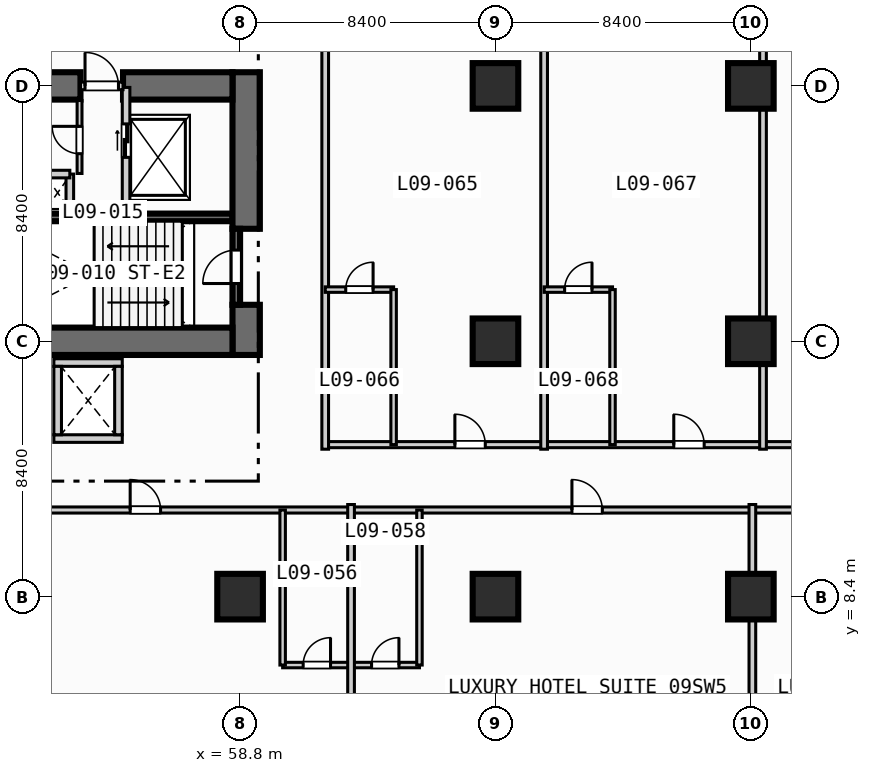
"""IFC4 building model, lengths in metres.
Left out: names, types, materials, properties, quantities, classifications, styles, units other than length and angle.
Written with IfcOpenShell. Run it as: python <this file> out.ifc"""

import sys

from ifc_helpers import new_model, si_unit, direction, frame, frame_2d, origin, origin_2d, place, context, subcontext, project, spatial, rectangle, extrude, element, fill, save


model = new_model("IFC4")
c1 = context("Model", 3, precision=1e-05, world=origin(), true_north=direction((0.0, 1.0)))
c2 = subcontext(c1, "Body", "Model", "MODEL_VIEW")
j1 = project(units=[si_unit("LENGTHUNIT", "METRE"), si_unit("PLANEANGLEUNIT", "RADIAN")], contexts=[c1])
p1 = place(None, origin())
s1 = spatial("IfcSite", under=j1, at=p1, CompositionType="ELEMENT")
p2 = place(p1, origin())
s2 = spatial("IfcBuilding", under=s1, at=p2, CompositionType="ELEMENT")
p3 = place(p2, frame((0.0, 0.0, 43.4)))
s3 = spatial("IfcBuildingStorey", under=s2, at=p3, CompositionType="ELEMENT", Elevation=43.4)
p4 = place(p3, frame((50.5, 20.875, 0.0), z_axis=(0.0, 0.0, 1.0), x_axis=(1.0, 0.0, 0.0)))
e1 = element("IfcWall", 1, at=p4, inside=s3, PredefinedType="SOLIDWALL", context=c2, shape_type="SweptSolid", body=[
    extrude(rectangle(XDim=8.05, YDim=0.25, at=frame_2d((4.025, 0.0))), origin(), (0.0, 0.0, 1.0), 3.55),
])
p5 = place(p3, frame((59.0, 16.35, 0.0), z_axis=(0.0, 0.0, 1.0), x_axis=(0.0, 1.0, 0.0)))
e2 = element("IfcWall", 2, at=p5, inside=s3, PredefinedType="SHEAR", context=c2, shape_type="SweptSolid", body=[
    extrude(rectangle(XDim=1.65, YDim=0.9, at=frame_2d((0.825, 0.0))), origin(), (0.0, 0.0, 1.0), 3.55),
])
p6 = place(p3, frame((59.0, 20.5, 0.0), z_axis=(0.0, 0.0, 1.0), x_axis=(0.0, 1.0, 0.0)))
e3 = element("IfcWall", 3, at=p6, inside=s3, PredefinedType="SHEAR", context=c2, shape_type="SweptSolid", body=[
    extrude(rectangle(XDim=5.15, YDim=0.9, at=frame_2d((2.575, 0.0))), origin(), (0.0, 0.0, 1.0), 3.55),
])
p7 = place(p3, frame((42.2, 16.8, 0.0), z_axis=(0.0, 0.0, 1.0), x_axis=(1.0, 0.0, 0.0)))
e4 = element("IfcWall", 4, at=p7, inside=s3, PredefinedType="SHEAR", context=c2, shape_type="SweptSolid", body=[
    extrude(rectangle(XDim=16.35, YDim=0.9, at=frame_2d((8.175, 0.0))), origin(), (0.0, 0.0, 1.0), 3.55),
])
p8 = place(p3, frame((52.28, 25.2, 0.0), z_axis=(0.0, 0.0, 1.0), x_axis=(1.0, 0.0, 0.0)))
e5 = element("IfcWall", 5, at=p8, inside=s3, PredefinedType="SHEAR", context=c2, shape_type="SweptSolid", body=[
    extrude(rectangle(XDim=1.27, YDim=0.9, at=frame_2d((0.635, 0.0))), origin(), (0.0, 0.0, 1.0), 3.55),
])
p9 = place(p3, frame((54.95, 25.2, 0.0), z_axis=(0.0, 0.0, 1.0), x_axis=(1.0, 0.0, 0.0)))
e6 = element("IfcWall", 6, at=p9, inside=s3, PredefinedType="SHEAR", context=c2, shape_type="SweptSolid", body=[
    extrude(rectangle(XDim=3.6, YDim=0.9, at=frame_2d((1.8, 0.0))), origin(), (0.0, 0.0, 1.0), 3.55),
])
for number, where, z_axis, x_axis in (
    (7, (58.8, 8.4, 0.0), (0.0, 0.0, 1.0), (1.0, 0.0, 0.0)),
    (8, (67.2, 8.4, 0.0), (0.0, 0.0, 1.0), (1.0, 0.0, 0.0)),
    (9, (67.2, 16.8, 0.0), (0.0, 0.0, 1.0), (1.0, 0.0, 0.0)),
    (10, (67.2, 25.2, 0.0), (0.0, 0.0, 1.0), (1.0, 0.0, 0.0)),
    (11, (75.6, 8.4, 0.0), (0.0, 0.0, 1.0), (1.0, 0.0, 0.0)),
    (12, (75.6, 16.8, 0.0), (0.0, 0.0, 1.0), (1.0, 0.0, 0.0)),
    (13, (75.6, 25.2, 0.0), (0.0, 0.0, 1.0), (1.0, 0.0, 0.0)),
):
    element("IfcColumn", number, at=place(p3, frame(where, z_axis=z_axis, x_axis=x_axis)), inside=s3, PredefinedType="COLUMN", context=c2, shape_type="SweptSolid", body=[
        extrude(rectangle(XDim=1.5, YDim=1.5, at=origin_2d()), origin(), (0.0, 0.0, 1.0), 3.8),
    ])
p10 = place(p3, frame((58.675, 18.0, 0.0), z_axis=(0.0, 0.0, 1.0), x_axis=(0.0, 1.0, 0.0)))
e14 = element("IfcWall", 14, at=p10, inside=s3, PredefinedType="SOLIDWALL", context=c2, shape_type="SweptSolid", body=[
    extrude(rectangle(XDim=2.5, YDim=0.25, at=frame_2d((1.25, 0.0))), origin(), (0.0, 0.0, 1.0), 3.55),
])
p11 = place(p10, frame((0.7, 0.0, 0.0)))
e15 = element("IfcOpeningElement", 15, at=p11, cuts=e14, PredefinedType="OPENING", context=c2, shape_type="SweptSolid", body=[
    extrude(rectangle(XDim=1.1, YDim=2.15, at=frame_2d((0.55, 1.075))), frame((0.0, 0.135, 0.0), z_axis=(0.0, -1.0, 0.0), x_axis=(1.0, 0.0, 0.0)), (0.0, 0.0, 1.0), 0.27),
])
p12 = place(p3, frame((55.05, 21.0, 0.0), z_axis=(0.0, 0.0, 1.0), x_axis=(0.0, 1.0, 0.0)))
e16 = element("IfcWall", 16, at=p12, inside=s3, PredefinedType="SOLIDWALL", context=c2, shape_type="SweptSolid", body=[
    extrude(rectangle(XDim=4.15, YDim=0.25, at=frame_2d((2.075, 0.0))), origin(), (0.0, 0.0, 1.0), 3.55),
])
p13 = place(p12, frame((1.85, 0.0, 0.0)))
e17 = element("IfcOpeningElement", 17, at=p13, cuts=e16, PredefinedType="OPENING", context=c2, shape_type="SweptSolid", body=[
    extrude(rectangle(XDim=1.1, YDim=2.15, at=frame_2d((0.55, 1.075))), frame((0.0, 0.135, 0.0), z_axis=(0.0, -1.0, 0.0), x_axis=(1.0, 0.0, 0.0)), (0.0, 0.0, 1.0), 0.27),
])
p14 = place(p3, frame((53.55, 25.2, 0.0), z_axis=(0.0, 0.0, 1.0), x_axis=(1.0, 0.0, 0.0)))
e18 = element("IfcWall", 18, at=p14, inside=s3, PredefinedType="SOLIDWALL", context=c2, shape_type="SweptSolid", body=[
    extrude(rectangle(XDim=1.4, YDim=0.25, at=frame_2d((0.7, 0.0))), origin(), (0.0, 0.0, 1.0), 3.55),
])
p15 = place(p14, frame((0.15, 0.0, 0.0)))
e19 = element("IfcOpeningElement", 19, at=p15, cuts=e18, PredefinedType="OPENING", context=c2, shape_type="SweptSolid", body=[
    extrude(rectangle(XDim=1.1, YDim=2.15, at=frame_2d((0.55, 1.075))), frame((0.0, 0.135, 0.0), z_axis=(0.0, -1.0, 0.0), x_axis=(1.0, 0.0, 0.0)), (0.0, 0.0, 1.0), 0.27),
])
p16 = place(p3, frame((53.2, 21.0, 0.0), z_axis=(0.0, 0.0, 1.0), x_axis=(0.0, 1.0, 0.0)))
e20 = element("IfcWall", 20, at=p16, inside=s3, PredefinedType="SOLIDWALL", context=c2, shape_type="SweptSolid", body=[
    extrude(rectangle(XDim=1.3, YDim=0.25, at=frame_2d((0.65, 0.0))), origin(), (0.0, 0.0, 1.0), 3.55),
])
p17 = place(p3, frame((52.36, 22.3, 0.0), z_axis=(0.0, 0.0, 1.0), x_axis=(1.0, 0.0, 0.0)))
e21 = element("IfcWall", 21, at=p17, inside=s3, PredefinedType="SOLIDWALL", context=c2, shape_type="SweptSolid", body=[
    extrude(rectangle(XDim=0.84, YDim=0.25, at=frame_2d((0.42, 0.0))), origin(), (0.0, 0.0, 1.0), 3.55),
])
p18 = place(p3, frame((53.52, 22.32, 0.0), z_axis=(0.0, 0.0, 1.0), x_axis=(0.0, 1.0, 0.0)))
e22 = element("IfcWall", 22, at=p18, inside=s3, PredefinedType="PARTITIONING", context=c2, shape_type="SweptSolid", body=[
    extrude(rectangle(XDim=2.4, YDim=0.16, at=frame_2d((1.2, 0.0))), origin(), (0.0, 0.0, 1.0), 3.55),
])
p19 = place(p18, frame((0.65, 0.0, 0.0)))
e23 = element("IfcOpeningElement", 23, at=p19, cuts=e22, PredefinedType="OPENING", context=c2, shape_type="SweptSolid", body=[
    extrude(rectangle(XDim=0.9, YDim=2.1, at=frame_2d((0.45, 1.05))), frame((0.0, 0.09, 0.0), z_axis=(0.0, -1.0, 0.0), x_axis=(1.0, 0.0, 0.0)), (0.0, 0.0, 1.0), 0.18),
])
for number, where, z_axis, x_axis in (
    (24, (52.675, 13.6, 0.0), (0.0, 0.0, 1.0), (1.0, 0.0, 0.0)),
    (25, (52.675, 16.1, 0.0), (0.0, 0.0, 1.0), (1.0, 0.0, 0.0)),
    (26, (52.8, 13.725, 0.0), (0.0, 0.0, 1.0), (0.0, 1.0, 0.0)),
    (27, (54.8, 13.725, 0.0), (0.0, 0.0, 1.0), (0.0, 1.0, 0.0)),
):
    element("IfcWall", number, at=place(p3, frame(where, z_axis=z_axis, x_axis=x_axis)), inside=s3, PredefinedType="SOLIDWALL", context=c2, shape_type="SweptSolid", body=[
        extrude(rectangle(XDim=2.25, YDim=0.25, at=frame_2d((1.125, 0.0))), origin(), (0.0, 0.0, 1.0), 3.55),
    ])
p20 = place(p3, frame((13.65, 11.25, 0.0), z_axis=(0.0, 0.0, 1.0), x_axis=(1.0, 0.0, 0.0)))
e28 = element("IfcWall", 28, at=p20, inside=s3, PredefinedType="PARTITIONING", context=c2, shape_type="SweptSolid", body=[
    extrude(rectangle(XDim=75.15, YDim=0.2, at=frame_2d((37.575, 0.0))), origin(), (0.0, 0.0, 1.0), 3.55),
])
p21 = place(p20, frame((7.265, 0.0, 0.0)))
e29 = element("IfcOpeningElement", 29, at=p21, cuts=e28, PredefinedType="OPENING", context=c2, shape_type="SweptSolid", body=[
    extrude(rectangle(XDim=1.0, YDim=2.15, at=frame_2d((0.5, 1.075))), frame((0.0, 0.11, 0.0), z_axis=(0.0, -1.0, 0.0), x_axis=(1.0, 0.0, 0.0)), (0.0, 0.0, 1.0), 0.22),
])
p22 = place(p20, frame((17.135, 0.0, 0.0)))
e30 = element("IfcOpeningElement", 30, at=p22, cuts=e28, PredefinedType="OPENING", context=c2, shape_type="SweptSolid", body=[
    extrude(rectangle(XDim=1.0, YDim=2.15, at=frame_2d((0.5, 1.075))), frame((0.0, 0.11, 0.0), z_axis=(0.0, -1.0, 0.0), x_axis=(1.0, 0.0, 0.0)), (0.0, 0.0, 1.0), 0.22),
])
p23 = place(p20, frame((31.665, 0.0, 0.0)))
e31 = element("IfcOpeningElement", 31, at=p23, cuts=e28, PredefinedType="OPENING", context=c2, shape_type="SweptSolid", body=[
    extrude(rectangle(XDim=1.0, YDim=2.15, at=frame_2d((0.5, 1.075))), frame((0.0, 0.11, 0.0), z_axis=(0.0, -1.0, 0.0), x_axis=(1.0, 0.0, 0.0)), (0.0, 0.0, 1.0), 0.22),
])
p24 = place(p20, frame((41.535, 0.0, 0.0)))
e32 = element("IfcOpeningElement", 32, at=p24, cuts=e28, PredefinedType="OPENING", context=c2, shape_type="SweptSolid", body=[
    extrude(rectangle(XDim=1.0, YDim=2.15, at=frame_2d((0.5, 1.075))), frame((0.0, 0.11, 0.0), z_axis=(0.0, -1.0, 0.0), x_axis=(1.0, 0.0, 0.0)), (0.0, 0.0, 1.0), 0.22),
])
p25 = place(p20, frame((56.065, 0.0, 0.0)))
e33 = element("IfcOpeningElement", 33, at=p25, cuts=e28, PredefinedType="OPENING", context=c2, shape_type="SweptSolid", body=[
    extrude(rectangle(XDim=1.0, YDim=2.15, at=frame_2d((0.5, 1.075))), frame((0.0, 0.11, 0.0), z_axis=(0.0, -1.0, 0.0), x_axis=(1.0, 0.0, 0.0)), (0.0, 0.0, 1.0), 0.22),
])
p26 = place(p20, frame((66.91, 0.0, 0.0)))
e34 = element("IfcOpeningElement", 34, at=p26, cuts=e28, PredefinedType="OPENING", context=c2, shape_type="SweptSolid", body=[
    extrude(rectangle(XDim=1.0, YDim=2.15, at=frame_2d((0.5, 1.075))), frame((0.0, 0.11, 0.0), z_axis=(0.0, -1.0, 0.0), x_axis=(1.0, 0.0, 0.0)), (0.0, 0.0, 1.0), 0.22),
])
p27 = place(p3, frame((60.2, 6.15, 0.0), z_axis=(0.0, 0.0, 1.0), x_axis=(1.0, 0.0, 0.0)))
e35 = element("IfcWall", 35, at=p27, inside=s3, PredefinedType="PLUMBINGWALL", context=c2, shape_type="SweptSolid", body=[
    extrude(rectangle(XDim=4.5, YDim=0.18, at=frame_2d((2.25, 0.0))), origin(), (0.0, 0.0, 1.0), 3.55),
])
p28 = place(p27, frame((0.675, 0.0, 0.0)))
e36 = element("IfcOpeningElement", 36, at=p28, cuts=e35, PredefinedType="OPENING", context=c2, shape_type="SweptSolid", body=[
    extrude(rectangle(XDim=0.9, YDim=2.1, at=frame_2d((0.45, 1.05))), frame((0.0, 0.1, 0.0), z_axis=(0.0, -1.0, 0.0), x_axis=(1.0, 0.0, 0.0)), (0.0, 0.0, 1.0), 0.2),
])
p29 = place(p27, frame((2.925, 0.0, 0.0)))
e37 = element("IfcOpeningElement", 37, at=p29, cuts=e35, PredefinedType="OPENING", context=c2, shape_type="SweptSolid", body=[
    extrude(rectangle(XDim=0.9, YDim=2.1, at=frame_2d((0.45, 1.05))), frame((0.0, 0.1, 0.0), z_axis=(0.0, -1.0, 0.0), x_axis=(1.0, 0.0, 0.0)), (0.0, 0.0, 1.0), 0.2),
])
p30 = place(p3, frame((60.2, 6.15, 0.0), z_axis=(0.0, 0.0, 1.0), x_axis=(0.0, 1.0, 0.0)))
e38 = element("IfcWall", 38, at=p30, inside=s3, PredefinedType="PLUMBINGWALL", context=c2, shape_type="SweptSolid", body=[
    extrude(rectangle(XDim=5.1, YDim=0.18, at=frame_2d((2.55, 0.0))), origin(), (0.0, 0.0, 1.0), 3.55),
])
p31 = place(p3, frame((62.45, 0.2, 0.0), z_axis=(0.0, 0.0, 1.0), x_axis=(0.0, 1.0, 0.0)))
e39 = element("IfcWall", 39, at=p31, inside=s3, PredefinedType="PARTITIONING", context=c2, shape_type="SweptSolid", body=[
    extrude(rectangle(XDim=11.23, YDim=0.22, at=frame_2d((5.615, 0.0))), origin(), (0.0, 0.0, 1.0), 3.55),
])
p32 = place(p3, frame((64.7, 6.15, 0.0), z_axis=(0.0, 0.0, 1.0), x_axis=(0.0, 1.0, 0.0)))
e40 = element("IfcWall", 40, at=p32, inside=s3, PredefinedType="PLUMBINGWALL", context=c2, shape_type="SweptSolid", body=[
    extrude(rectangle(XDim=5.1, YDim=0.18, at=frame_2d((2.55, 0.0))), origin(), (0.0, 0.0, 1.0), 3.55),
])
p33 = place(p3, frame((75.65, 0.2, 0.0), z_axis=(0.0, 0.0, 1.0), x_axis=(0.0, 1.0, 0.0)))
e41 = element("IfcWall", 41, at=p33, inside=s3, PredefinedType="PARTITIONING", context=c2, shape_type="SweptSolid", body=[
    extrude(rectangle(XDim=11.23, YDim=0.22, at=frame_2d((5.615, 0.0))), origin(), (0.0, 0.0, 1.0), 2.8),
])
p34 = place(p3, frame((61.6, 13.4, 0.0), z_axis=(0.0, 0.0, 1.0), x_axis=(1.0, 0.0, 0.0)))
e42 = element("IfcWall", 42, at=p34, inside=s3, PredefinedType="PARTITIONING", context=c2, shape_type="SweptSolid", body=[
    extrude(rectangle(XDim=27.2, YDim=0.2, at=frame_2d((13.6, 0.0))), origin(), (0.0, 0.0, 1.0), 3.55),
])
p35 = place(p34, frame((4.265, 0.0, 0.0)))
e43 = element("IfcOpeningElement", 43, at=p35, cuts=e42, PredefinedType="OPENING", context=c2, shape_type="SweptSolid", body=[
    extrude(rectangle(XDim=1.0, YDim=2.15, at=frame_2d((0.5, 1.075))), frame((0.0, 0.11, 0.0), z_axis=(0.0, -1.0, 0.0), x_axis=(1.0, 0.0, 0.0)), (0.0, 0.0, 1.0), 0.22),
])
p36 = place(p34, frame((11.465, 0.0, 0.0)))
e44 = element("IfcOpeningElement", 44, at=p36, cuts=e42, PredefinedType="OPENING", context=c2, shape_type="SweptSolid", body=[
    extrude(rectangle(XDim=1.0, YDim=2.15, at=frame_2d((0.5, 1.075))), frame((0.0, 0.11, 0.0), z_axis=(0.0, -1.0, 0.0), x_axis=(1.0, 0.0, 0.0)), (0.0, 0.0, 1.0), 0.22),
])
p37 = place(p34, frame((15.935, 0.0, 0.0)))
e45 = element("IfcOpeningElement", 45, at=p37, cuts=e42, PredefinedType="OPENING", context=c2, shape_type="SweptSolid", body=[
    extrude(rectangle(XDim=1.0, YDim=2.15, at=frame_2d((0.5, 1.075))), frame((0.0, 0.11, 0.0), z_axis=(0.0, -1.0, 0.0), x_axis=(1.0, 0.0, 0.0)), (0.0, 0.0, 1.0), 0.22),
])
p38 = place(p34, frame((22.335, 0.0, 0.0)))
e46 = element("IfcOpeningElement", 46, at=p38, cuts=e42, PredefinedType="OPENING", context=c2, shape_type="SweptSolid", body=[
    extrude(rectangle(XDim=1.0, YDim=2.15, at=frame_2d((0.5, 1.075))), frame((0.0, 0.11, 0.0), z_axis=(0.0, -1.0, 0.0), x_axis=(1.0, 0.0, 0.0)), (0.0, 0.0, 1.0), 0.22),
])
p39 = place(p3, frame((61.6, 13.25, 0.0), z_axis=(0.0, 0.0, 1.0), x_axis=(0.0, 1.0, 0.0)))
e47 = element("IfcWall", 47, at=p39, inside=s3, PredefinedType="PARTITIONING", context=c2, shape_type="SweptSolid", body=[
    extrude(rectangle(XDim=20.18, YDim=0.22, at=frame_2d((10.09, 0.0))), origin(), (0.0, 0.0, 1.0), 3.55),
])
p40 = place(p3, frame((61.6, 18.5, 0.0), z_axis=(0.0, 0.0, 1.0), x_axis=(1.0, 0.0, 0.0)))
e48 = element("IfcWall", 48, at=p40, inside=s3, PredefinedType="PLUMBINGWALL", context=c2, shape_type="SweptSolid", body=[
    extrude(rectangle(XDim=2.25, YDim=0.18, at=frame_2d((1.125, 0.0))), origin(), (0.0, 0.0, 1.0), 3.55),
])
p41 = place(p40, frame((0.675, 0.0, 0.0)))
e49 = element("IfcOpeningElement", 49, at=p41, cuts=e48, PredefinedType="OPENING", context=c2, shape_type="SweptSolid", body=[
    extrude(rectangle(XDim=0.9, YDim=2.1, at=frame_2d((0.45, 1.05))), frame((0.0, 0.1, 0.0), z_axis=(0.0, -1.0, 0.0), x_axis=(1.0, 0.0, 0.0)), (0.0, 0.0, 1.0), 0.2),
])
p42 = place(p3, frame((63.85, 13.4, 0.0), z_axis=(0.0, 0.0, 1.0), x_axis=(0.0, 1.0, 0.0)))
e50 = element("IfcWall", 50, at=p42, inside=s3, PredefinedType="PLUMBINGWALL", context=c2, shape_type="SweptSolid", body=[
    extrude(rectangle(XDim=5.1, YDim=0.18, at=frame_2d((2.55, 0.0))), origin(), (0.0, 0.0, 1.0), 3.55),
])
p43 = place(p3, frame((68.8, 13.25, 0.0), z_axis=(0.0, 0.0, 1.0), x_axis=(0.0, 1.0, 0.0)))
e51 = element("IfcWall", 51, at=p43, inside=s3, PredefinedType="PARTITIONING", context=c2, shape_type="SweptSolid", body=[
    extrude(rectangle(XDim=20.18, YDim=0.22, at=frame_2d((10.09, 0.0))), origin(), (0.0, 0.0, 1.0), 3.55),
])
p44 = place(p3, frame((68.8, 18.5, 0.0), z_axis=(0.0, 0.0, 1.0), x_axis=(1.0, 0.0, 0.0)))
e52 = element("IfcWall", 52, at=p44, inside=s3, PredefinedType="PLUMBINGWALL", context=c2, shape_type="SweptSolid", body=[
    extrude(rectangle(XDim=2.25, YDim=0.18, at=frame_2d((1.125, 0.0))), origin(), (0.0, 0.0, 1.0), 3.55),
])
p45 = place(p44, frame((0.675, 0.0, 0.0)))
e53 = element("IfcOpeningElement", 53, at=p45, cuts=e52, PredefinedType="OPENING", context=c2, shape_type="SweptSolid", body=[
    extrude(rectangle(XDim=0.9, YDim=2.1, at=frame_2d((0.45, 1.05))), frame((0.0, 0.1, 0.0), z_axis=(0.0, -1.0, 0.0), x_axis=(1.0, 0.0, 0.0)), (0.0, 0.0, 1.0), 0.2),
])
p46 = place(p3, frame((71.05, 13.4, 0.0), z_axis=(0.0, 0.0, 1.0), x_axis=(0.0, 1.0, 0.0)))
e54 = element("IfcWall", 54, at=p46, inside=s3, PredefinedType="PLUMBINGWALL", context=c2, shape_type="SweptSolid", body=[
    extrude(rectangle(XDim=5.1, YDim=0.18, at=frame_2d((2.55, 0.0))), origin(), (0.0, 0.0, 1.0), 3.55),
])
p47 = place(p3, frame((76.0, 13.25, 0.0), z_axis=(0.0, 0.0, 1.0), x_axis=(0.0, 1.0, 0.0)))
e55 = element("IfcWall", 55, at=p47, inside=s3, PredefinedType="PARTITIONING", context=c2, shape_type="SweptSolid", body=[
    extrude(rectangle(XDim=20.18, YDim=0.22, at=frame_2d((10.09, 0.0))), origin(), (0.0, 0.0, 1.0), 3.55),
])
p48 = place(p11, origin())
e56 = element("IfcDoor", 56, at=p48, inside=s3, OperationType="SINGLE_SWING_LEFT", PredefinedType="DOOR", context=c2, shape_type="SweptSolid", body=[
    extrude(rectangle(XDim=1.1, YDim=2.15, at=frame_2d((0.55, 1.075))), frame((0.0, 0.025, 0.0), z_axis=(0.0, -1.0, 0.0), x_axis=(1.0, 0.0, 0.0)), (0.0, 0.0, 1.0), 0.05),
])
fill(e15, e56)
p49 = place(p13, origin())
e57 = element("IfcDoor", 57, at=p49, inside=s3, OperationType="SLIDING_TO_LEFT", PredefinedType="DOOR", context=c2, shape_type="SweptSolid", body=[
    extrude(rectangle(XDim=1.1, YDim=2.15, at=frame_2d((0.55, 1.075))), frame((0.0, 0.025, 0.0), z_axis=(0.0, -1.0, 0.0), x_axis=(1.0, 0.0, 0.0)), (0.0, 0.0, 1.0), 0.05),
])
fill(e17, e57)
p50 = place(p15, origin())
e58 = element("IfcDoor", 58, at=p50, inside=s3, OperationType="SINGLE_SWING_LEFT", PredefinedType="DOOR", context=c2, shape_type="SweptSolid", body=[
    extrude(rectangle(XDim=1.1, YDim=2.15, at=frame_2d((0.55, 1.075))), frame((0.0, 0.025, 0.0), z_axis=(0.0, -1.0, 0.0), x_axis=(1.0, 0.0, 0.0)), (0.0, 0.0, 1.0), 0.05),
])
fill(e19, e58)
p51 = place(p19, origin())
e59 = element("IfcDoor", 59, at=p51, inside=s3, OperationType="SINGLE_SWING_RIGHT", PredefinedType="DOOR", context=c2, shape_type="SweptSolid", body=[
    extrude(rectangle(XDim=0.9, YDim=2.1, at=frame_2d((0.45, 1.05))), frame((0.0, 0.025, 0.0), z_axis=(0.0, -1.0, 0.0), x_axis=(1.0, 0.0, 0.0)), (0.0, 0.0, 1.0), 0.05),
])
fill(e23, e59)
p52 = place(p24, origin())
e60 = element("IfcDoor", 60, at=p52, inside=s3, OperationType="SINGLE_SWING_LEFT", PredefinedType="DOOR", context=c2, shape_type="SweptSolid", body=[
    extrude(rectangle(XDim=1.0, YDim=2.15, at=frame_2d((0.5, 1.075))), frame((0.0, 0.025, 0.0), z_axis=(0.0, -1.0, 0.0), x_axis=(1.0, 0.0, 0.0)), (0.0, 0.0, 1.0), 0.05),
])
fill(e32, e60)
p53 = place(p25, origin())
e61 = element("IfcDoor", 61, at=p53, inside=s3, OperationType="SINGLE_SWING_LEFT", PredefinedType="DOOR", context=c2, shape_type="SweptSolid", body=[
    extrude(rectangle(XDim=1.0, YDim=2.15, at=frame_2d((0.5, 1.075))), frame((0.0, 0.025, 0.0), z_axis=(0.0, -1.0, 0.0), x_axis=(1.0, 0.0, 0.0)), (0.0, 0.0, 1.0), 0.05),
])
fill(e33, e61)
p54 = place(p28, origin())
e62 = element("IfcDoor", 62, at=p54, inside=s3, OperationType="SINGLE_SWING_RIGHT", PredefinedType="DOOR", context=c2, shape_type="SweptSolid", body=[
    extrude(rectangle(XDim=0.9, YDim=2.1, at=frame_2d((0.45, 1.05))), frame((0.0, 0.025, 0.0), z_axis=(0.0, -1.0, 0.0), x_axis=(1.0, 0.0, 0.0)), (0.0, 0.0, 1.0), 0.05),
])
fill(e36, e62)
p55 = place(p29, origin())
e63 = element("IfcDoor", 63, at=p55, inside=s3, OperationType="SINGLE_SWING_RIGHT", PredefinedType="DOOR", context=c2, shape_type="SweptSolid", body=[
    extrude(rectangle(XDim=0.9, YDim=2.1, at=frame_2d((0.45, 1.05))), frame((0.0, 0.025, 0.0), z_axis=(0.0, -1.0, 0.0), x_axis=(1.0, 0.0, 0.0)), (0.0, 0.0, 1.0), 0.05),
])
fill(e37, e63)
p56 = place(p35, origin())
e64 = element("IfcDoor", 64, at=p56, inside=s3, OperationType="SINGLE_SWING_LEFT", PredefinedType="DOOR", context=c2, shape_type="SweptSolid", body=[
    extrude(rectangle(XDim=1.0, YDim=2.15, at=frame_2d((0.5, 1.075))), frame((0.0, 0.025, 0.0), z_axis=(0.0, -1.0, 0.0), x_axis=(1.0, 0.0, 0.0)), (0.0, 0.0, 1.0), 0.05),
])
fill(e43, e64)
p57 = place(p36, origin())
e65 = element("IfcDoor", 65, at=p57, inside=s3, OperationType="SINGLE_SWING_LEFT", PredefinedType="DOOR", context=c2, shape_type="SweptSolid", body=[
    extrude(rectangle(XDim=1.0, YDim=2.15, at=frame_2d((0.5, 1.075))), frame((0.0, 0.025, 0.0), z_axis=(0.0, -1.0, 0.0), x_axis=(1.0, 0.0, 0.0)), (0.0, 0.0, 1.0), 0.05),
])
fill(e44, e65)
p58 = place(p41, origin())
e66 = element("IfcDoor", 66, at=p58, inside=s3, OperationType="SINGLE_SWING_RIGHT", PredefinedType="DOOR", context=c2, shape_type="SweptSolid", body=[
    extrude(rectangle(XDim=0.9, YDim=2.1, at=frame_2d((0.45, 1.05))), frame((0.0, 0.025, 0.0), z_axis=(0.0, -1.0, 0.0), x_axis=(1.0, 0.0, 0.0)), (0.0, 0.0, 1.0), 0.05),
])
fill(e49, e66)
p59 = place(p45, origin())
e67 = element("IfcDoor", 67, at=p59, inside=s3, OperationType="SINGLE_SWING_RIGHT", PredefinedType="DOOR", context=c2, shape_type="SweptSolid", body=[
    extrude(rectangle(XDim=0.9, YDim=2.1, at=frame_2d((0.45, 1.05))), frame((0.0, 0.025, 0.0), z_axis=(0.0, -1.0, 0.0), x_axis=(1.0, 0.0, 0.0)), (0.0, 0.0, 1.0), 0.05),
])
fill(e53, e67)
save(model, sys.argv[1])
